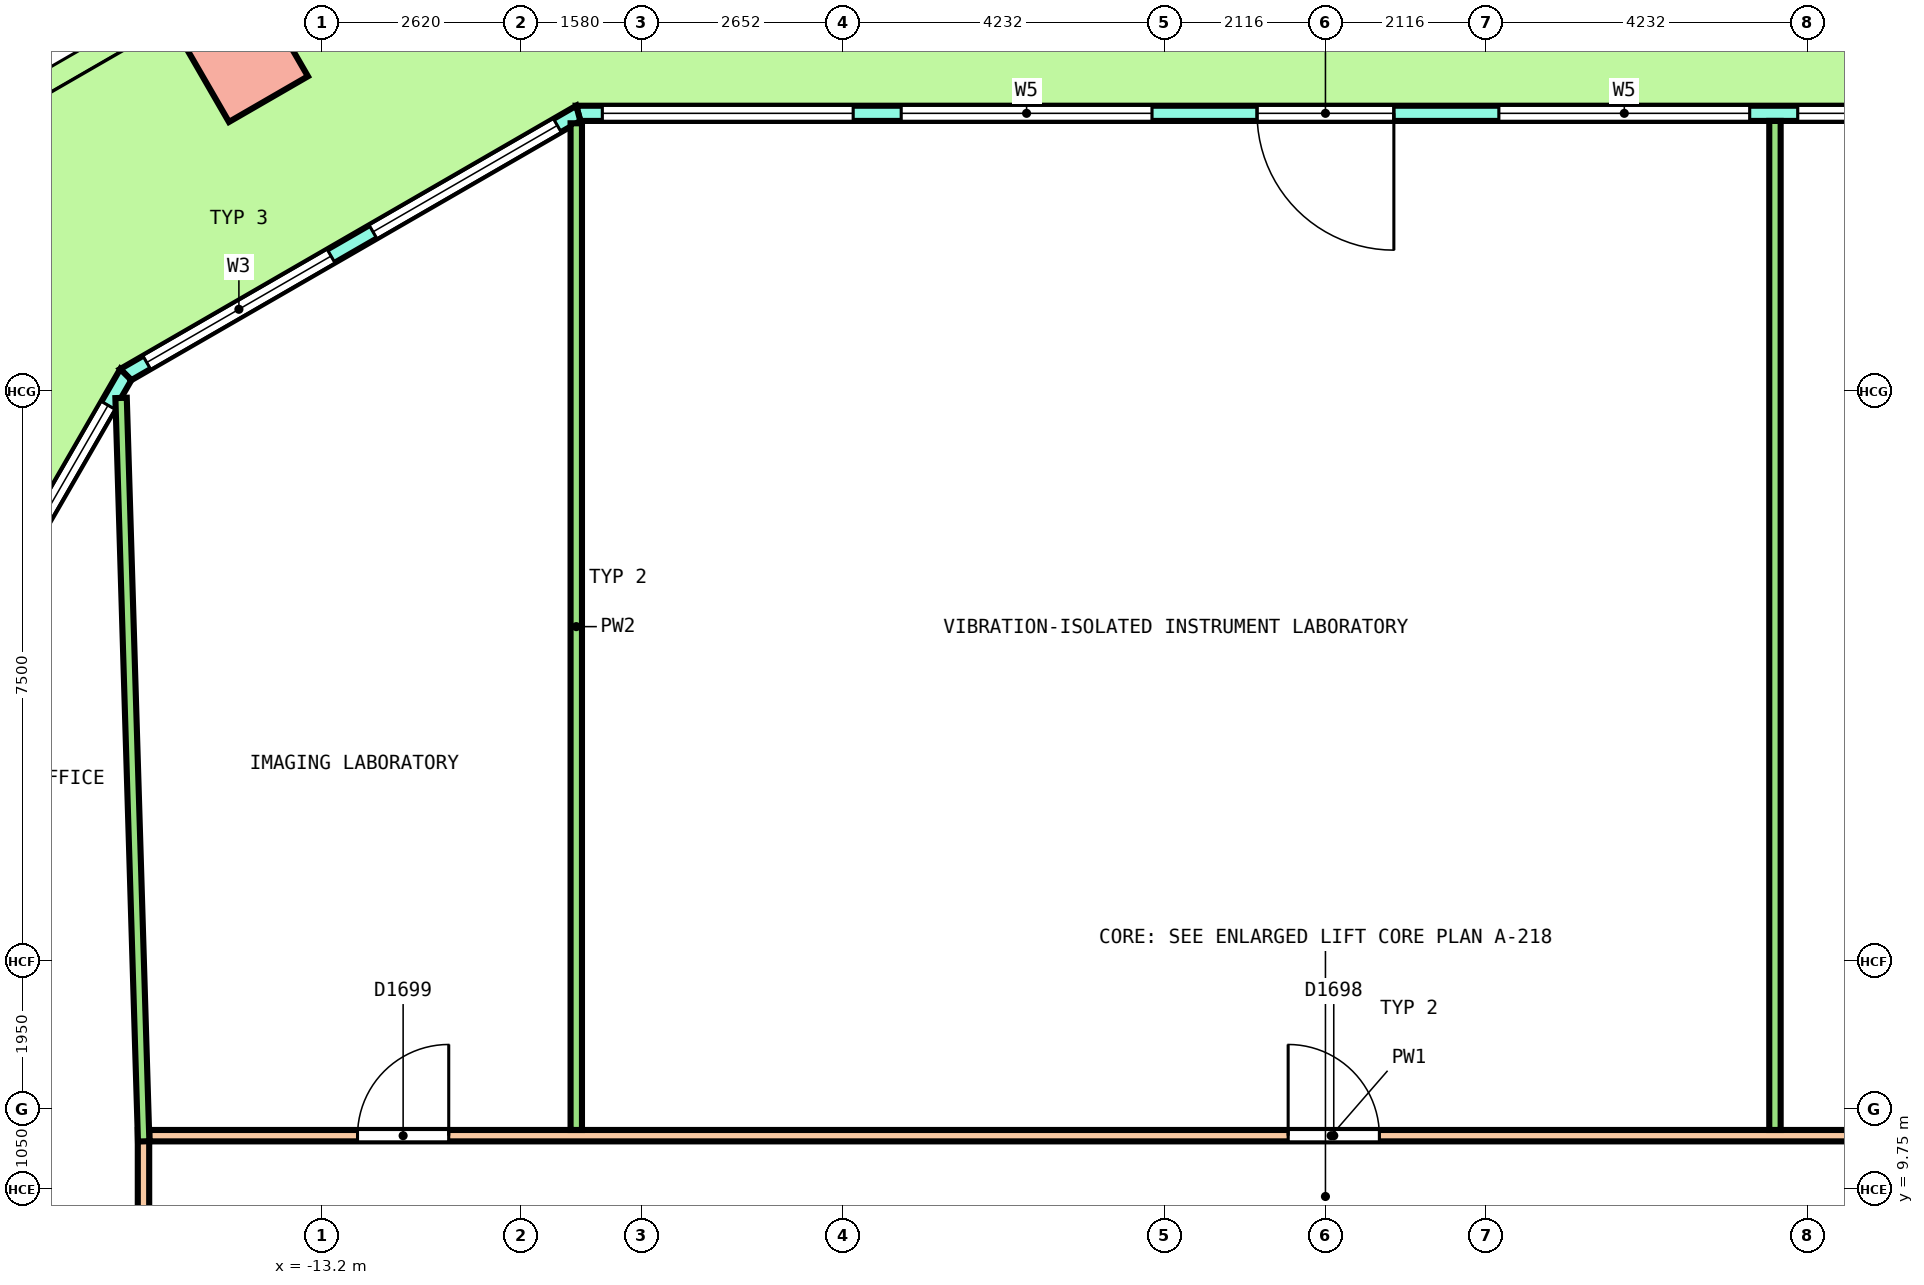
"""IFC4 building model, lengths in metres.
Left out: names, types, materials, properties, quantities, classifications, styles, units other than length and angle.
Written with IfcOpenShell. Run it as: python <this file> out.ifc"""

import sys

from ifc_helpers import new_model, si_unit, direction, frame, frame_2d, origin, origin_2d, place, context, subcontext, project, spatial, polyline, rectangle, outline, extrude, element, fill, save


model = new_model("IFC4")
c1 = context("Model", 3, precision=1e-05, world=origin(), true_north=direction((0.0, 1.0)))
c2 = subcontext(c1, "Body", "Model", "MODEL_VIEW")
j1 = project(units=[si_unit("LENGTHUNIT", "METRE"), si_unit("PLANEANGLEUNIT", "RADIAN")], contexts=[c1])
p1 = place(None, origin())
s1 = spatial("IfcSite", under=j1, at=p1, CompositionType="ELEMENT")
p2 = place(p1, origin())
s2 = spatial("IfcBuilding", under=s1, at=p2, CompositionType="ELEMENT")
p3 = place(p2, frame((0.0, 0.0, 145.2)))
s3 = spatial("IfcBuildingStorey", under=s2, at=p3, CompositionType="ELEMENT", Elevation=145.2)
p4 = place(p3, frame((-14.206, 24.606, 0.0), z_axis=(-0.036325398096, 0.0, 0.999340014936), x_axis=(-0.865311654478, -0.500246354177, -0.031453549198)))
e1 = element("IfcColumn", 1, at=p4, inside=s3, PredefinedType="COLUMN", context=c2, shape_type="SweptSolid", body=[
    extrude(rectangle(XDim=1.2, YDim=1.2, at=origin_2d()), origin(), (0.0, 0.0, 1.0), 4.053),
])
p5 = place(p3, frame((9.83, 23.9, 0.0), z_axis=(0.0, 0.0, 1.0), x_axis=(-1.0, 0.0, 0.0)))
e2 = element("IfcWall", 2, at=p5, inside=s3, PredefinedType="SOLIDWALL", context=c2, shape_type="SweptSolid", body=[
    extrude(outline(polyline([(-0.027, -0.1), (1.011, -0.1), (2.048, -0.1), (3.086, -0.1), (4.123, -0.1), (5.161, -0.1), (6.198, -0.1), (7.236, -0.1), (8.273, -0.1), (9.311, -0.1), (10.348, -0.1), (11.386, -0.1), (12.423, -0.1), (13.461, -0.1), (14.499, -0.1), (15.536, -0.1), (16.573, -0.1), (17.611, -0.1), (18.648, -0.1), (19.686, -0.1), (19.632, 0.1), (18.6, 0.1), (17.569, 0.1), (16.537, 0.1), (15.505, 0.1), (14.473, 0.1), (13.441, 0.1), (12.409, 0.1), (11.377, 0.1), (10.345, 0.1), (9.314, 0.1), (8.282, 0.1), (7.25, 0.1), (6.218, 0.1), (5.186, 0.1), (4.154, 0.1), (3.123, 0.1), (2.091, 0.1), (1.059, 0.1), (0.027, 0.1), (-0.027, -0.1)])), origin(), (0.0, 0.0, 1.0), 4.1),
])
p6 = place(p5, frame((0.316, 0.0, 0.1)))
e3 = element("IfcOpeningElement", 3, at=p6, cuts=e2, PredefinedType="OPENING", context=c2, shape_type="SweptSolid", body=[
    extrude(rectangle(XDim=3.3, YDim=2.9, at=frame_2d((1.65, 1.45))), frame((0.0, 0.11, 0.0), z_axis=(0.0, -1.0, 0.0), x_axis=(1.0, 0.0, 0.0)), (0.0, 0.0, 1.0), 0.22),
])
p7 = place(p5, frame((4.248, 0.0, 0.1)))
e4 = element("IfcOpeningElement", 4, at=p7, cuts=e2, PredefinedType="OPENING", context=c2, shape_type="SweptSolid", body=[
    extrude(rectangle(XDim=3.3, YDim=2.9, at=frame_2d((1.65, 1.45))), frame((0.0, 0.11, 0.0), z_axis=(0.0, -1.0, 0.0), x_axis=(1.0, 0.0, 0.0)), (0.0, 0.0, 1.0), 0.22),
])
p8 = place(p5, frame((8.93, 0.0, 0.0)))
e5 = element("IfcOpeningElement", 5, at=p8, cuts=e2, PredefinedType="OPENING", context=c2, shape_type="SweptSolid", body=[
    extrude(rectangle(XDim=1.8, YDim=2.4, at=frame_2d((0.9, 1.2))), frame((0.0, 0.11, 0.0), z_axis=(0.0, -1.0, 0.0), x_axis=(1.0, 0.0, 0.0)), (0.0, 0.0, 1.0), 0.22),
])
p9 = place(p5, frame((8.93, 0.0, 2.55)))
e6 = element("IfcOpeningElement", 6, at=p9, cuts=e2, PredefinedType="OPENING", context=c2, shape_type="SweptSolid", body=[
    extrude(rectangle(XDim=1.8, YDim=0.45, at=frame_2d((0.9, 0.225))), frame((0.0, 0.11, 0.0), z_axis=(0.0, -1.0, 0.0), x_axis=(1.0, 0.0, 0.0)), (0.0, 0.0, 1.0), 0.22),
])
p10 = place(p5, frame((12.112, 0.0, 0.1)))
e7 = element("IfcOpeningElement", 7, at=p10, cuts=e2, PredefinedType="OPENING", context=c2, shape_type="SweptSolid", body=[
    extrude(rectangle(XDim=3.3, YDim=2.9, at=frame_2d((1.65, 1.45))), frame((0.0, 0.11, 0.0), z_axis=(0.0, -1.0, 0.0), x_axis=(1.0, 0.0, 0.0)), (0.0, 0.0, 1.0), 0.22),
])
p11 = place(p5, frame((16.043, 0.0, 0.1)))
e8 = element("IfcOpeningElement", 8, at=p11, cuts=e2, PredefinedType="OPENING", context=c2, shape_type="SweptSolid", body=[
    extrude(rectangle(XDim=3.3, YDim=2.9, at=frame_2d((1.65, 1.45))), frame((0.0, 0.11, 0.0), z_axis=(0.0, -1.0, 0.0), x_axis=(1.0, 0.0, 0.0)), (0.0, 0.0, 1.0), 0.22),
])
p12 = place(p3, frame((-9.83, 23.9, 0.0), z_axis=(0.0, 0.0, 1.0), x_axis=(-0.866029458321, -0.49999297727, 0.0)))
e9 = element("IfcWall", 9, at=p12, inside=s3, PredefinedType="SOLIDWALL", context=c2, shape_type="SweptSolid", body=[
    extrude(outline(polyline([(-0.027, -0.1), (1.128, -0.1), (2.282, -0.1), (3.437, -0.1), (4.592, -0.1), (5.747, -0.1), (6.901, -0.1), (6.848, 0.1), (5.711, 0.1), (4.574, 0.1), (3.437, 0.1), (2.301, 0.1), (1.164, 0.1), (0.027, 0.1), (-0.027, -0.1)])), origin(), (0.0, 0.0, 1.0), 4.1),
])
p13 = place(p12, frame((0.319, 0.0, 0.1)))
e10 = element("IfcOpeningElement", 10, at=p13, cuts=e9, PredefinedType="OPENING", context=c2, shape_type="SweptSolid", body=[
    extrude(rectangle(XDim=2.8, YDim=2.9, at=frame_2d((1.4, 1.45))), frame((0.0, 0.11, 0.0), z_axis=(0.0, -1.0, 0.0), x_axis=(1.0, 0.0, 0.0)), (0.0, 0.0, 1.0), 0.22),
])
p14 = place(p12, frame((3.756, 0.0, 0.1)))
e11 = element("IfcOpeningElement", 11, at=p14, cuts=e9, PredefinedType="OPENING", context=c2, shape_type="SweptSolid", body=[
    extrude(rectangle(XDim=2.8, YDim=2.9, at=frame_2d((1.4, 1.45))), frame((0.0, 0.11, 0.0), z_axis=(0.0, -1.0, 0.0), x_axis=(1.0, 0.0, 0.0)), (0.0, 0.0, 1.0), 0.22),
])
p15 = place(p3, frame((-15.783, 20.463, 0.0), z_axis=(0.0, 0.0, 1.0), x_axis=(-0.499999083763, -0.866025932773, 0.0)))
e12 = element("IfcWall", 12, at=p15, inside=s3, PredefinedType="SOLIDWALL", context=c2, shape_type="SweptSolid", body=[
    extrude(outline(polyline([(-0.027, -0.1), (1.011, -0.1), (2.048, -0.1), (3.086, -0.1), (4.123, -0.1), (5.161, -0.1), (6.198, -0.1), (7.236, -0.1), (8.273, -0.1), (9.311, -0.1), (10.348, -0.1), (11.386, -0.1), (12.423, -0.1), (13.461, -0.1), (14.499, -0.1), (15.536, -0.1), (16.573, -0.1), (17.611, -0.1), (18.648, -0.1), (19.686, -0.1), (19.632, 0.1), (18.6, 0.1), (17.569, 0.1), (16.537, 0.1), (15.505, 0.1), (14.473, 0.1), (13.441, 0.1), (12.409, 0.1), (11.377, 0.1), (10.345, 0.1), (9.314, 0.1), (8.282, 0.1), (7.25, 0.1), (6.218, 0.1), (5.186, 0.1), (4.154, 0.1), (3.123, 0.1), (2.091, 0.1), (1.059, 0.1), (0.027, 0.1), (-0.027, -0.1)])), origin(), (0.0, 0.0, 1.0), 4.1),
])
p16 = place(p15, frame((0.466, 0.0, 0.1)))
e13 = element("IfcOpeningElement", 13, at=p16, cuts=e12, PredefinedType="OPENING", context=c2, shape_type="SweptSolid", body=[
    extrude(rectangle(XDim=3.0, YDim=2.9, at=frame_2d((1.5, 1.45))), frame((0.0, 0.11, 0.0), z_axis=(0.0, -1.0, 0.0), x_axis=(1.0, 0.0, 0.0)), (0.0, 0.0, 1.0), 0.22),
])
p17 = place(p15, frame((4.398, 0.0, 0.1)))
e14 = element("IfcOpeningElement", 14, at=p17, cuts=e12, PredefinedType="OPENING", context=c2, shape_type="SweptSolid", body=[
    extrude(rectangle(XDim=3.0, YDim=2.9, at=frame_2d((1.5, 1.45))), frame((0.0, 0.11, 0.0), z_axis=(0.0, -1.0, 0.0), x_axis=(1.0, 0.0, 0.0)), (0.0, 0.0, 1.0), 0.22),
])
p18 = place(p15, frame((8.93, 0.0, 0.0)))
e15 = element("IfcOpeningElement", 15, at=p18, cuts=e12, PredefinedType="OPENING", context=c2, shape_type="SweptSolid", body=[
    extrude(rectangle(XDim=1.8, YDim=2.4, at=frame_2d((0.9, 1.2))), frame((0.0, 0.11, 0.0), z_axis=(0.0, -1.0, 0.0), x_axis=(1.0, 0.0, 0.0)), (0.0, 0.0, 1.0), 0.22),
])
p19 = place(p15, frame((8.93, 0.0, 2.55)))
e16 = element("IfcOpeningElement", 16, at=p19, cuts=e12, PredefinedType="OPENING", context=c2, shape_type="SweptSolid", body=[
    extrude(rectangle(XDim=1.8, YDim=0.45, at=frame_2d((0.9, 0.225))), frame((0.0, 0.11, 0.0), z_axis=(0.0, -1.0, 0.0), x_axis=(1.0, 0.0, 0.0)), (0.0, 0.0, 1.0), 0.22),
])
p20 = place(p15, frame((12.261, 0.0, 0.1)))
e17 = element("IfcOpeningElement", 17, at=p20, cuts=e12, PredefinedType="OPENING", context=c2, shape_type="SweptSolid", body=[
    extrude(rectangle(XDim=3.0, YDim=2.9, at=frame_2d((1.5, 1.45))), frame((0.0, 0.11, 0.0), z_axis=(0.0, -1.0, 0.0), x_axis=(1.0, 0.0, 0.0)), (0.0, 0.0, 1.0), 0.22),
])
p21 = place(p15, frame((16.193, 0.0, 0.1)))
e18 = element("IfcOpeningElement", 18, at=p21, cuts=e12, PredefinedType="OPENING", context=c2, shape_type="SweptSolid", body=[
    extrude(rectangle(XDim=3.0, YDim=2.9, at=frame_2d((1.5, 1.45))), frame((0.0, 0.11, 0.0), z_axis=(0.0, -1.0, 0.0), x_axis=(1.0, 0.0, 0.0)), (0.0, 0.0, 1.0), 0.22),
])
p22 = place(p3, frame((-15.475, 10.45, 0.0), z_axis=(0.0, 0.0, 1.0), x_axis=(1.0, 0.0, 0.0)))
e19 = element("IfcWall", 19, at=p22, inside=s3, PredefinedType="PARTITIONING", context=c2, shape_type="SweptSolid", body=[
    extrude(rectangle(XDim=31.1, YDim=0.15, at=frame_2d((15.55, 0.0))), origin(), (0.0, 0.0, 1.0), 3.05),
])
p23 = place(p22, frame((25.521, 0.0, 0.0)))
e20 = element("IfcOpeningElement", 20, at=p23, cuts=e19, PredefinedType="OPENING", context=c2, shape_type="SweptSolid", body=[
    extrude(rectangle(XDim=1.2, YDim=2.1, at=frame_2d((0.6, 1.05))), frame((0.0, 0.085, 0.0), z_axis=(0.0, -1.0, 0.0), x_axis=(1.0, 0.0, 0.0)), (0.0, 0.0, 1.0), 0.17),
])
p24 = place(p22, frame((14.984, 0.0, 0.0)))
e21 = element("IfcOpeningElement", 21, at=p24, cuts=e19, PredefinedType="OPENING", context=c2, shape_type="SweptSolid", body=[
    extrude(rectangle(XDim=1.2, YDim=2.1, at=frame_2d((0.6, 1.05))), frame((0.0, 0.085, 0.0), z_axis=(0.0, -1.0, 0.0), x_axis=(1.0, 0.0, 0.0)), (0.0, 0.0, 1.0), 0.17),
])
p25 = place(p22, frame((2.741, 0.0, 0.0)))
e22 = element("IfcOpeningElement", 22, at=p25, cuts=e19, PredefinedType="OPENING", context=c2, shape_type="SweptSolid", body=[
    extrude(rectangle(XDim=1.2, YDim=2.1, at=frame_2d((0.6, 1.05))), frame((0.0, 0.085, 0.0), z_axis=(0.0, -1.0, 0.0), x_axis=(1.0, 0.0, 0.0)), (0.0, 0.0, 1.0), 0.17),
])
p26 = place(p3, frame((-15.55, 2.657, 0.0), z_axis=(0.0, 0.0, 1.0), x_axis=(0.0, 1.0, 0.0)))
e23 = element("IfcWall", 23, at=p26, inside=s3, PredefinedType="PARTITIONING", context=c2, shape_type="SweptSolid", body=[
    extrude(rectangle(XDim=7.868, YDim=0.15, at=frame_2d((3.934, 0.0))), origin(), (0.0, 0.0, 1.0), 3.05),
])
p27 = place(p3, frame((5.914, 10.525, 0.0), z_axis=(0.0, 0.0, 1.0), x_axis=(0.0, 1.0, 0.0)))
e24 = element("IfcWall", 24, at=p27, inside=s3, PredefinedType="PARTITIONING", context=c2, shape_type="SweptSolid", body=[
    extrude(rectangle(XDim=13.275, YDim=0.15, at=frame_2d((6.638, 0.0))), origin(), (0.0, 0.0, 1.0), 3.05),
])
p28 = place(p3, frame((-9.856, 10.525, 0.0), z_axis=(0.0, 0.0, 1.0), x_axis=(0.0, 1.0, 0.0)))
e25 = element("IfcWall", 25, at=p28, inside=s3, PredefinedType="PARTITIONING", context=c2, shape_type="SweptSolid", body=[
    extrude(rectangle(XDim=13.244, YDim=0.15, at=frame_2d((6.622, 0.0))), origin(), (0.0, 0.0, 1.0), 3.05),
])
p29 = place(p3, frame((-15.845, 20.156, 0.0), z_axis=(0.0, 0.0, 1.0), x_axis=(0.030388076232, -0.999538175771, 0.0)))
e26 = element("IfcWall", 26, at=p29, inside=s3, PredefinedType="PARTITIONING", context=c2, shape_type="SweptSolid", body=[
    extrude(rectangle(XDim=9.786, YDim=0.15, at=frame_2d((4.893, 0.0))), origin(), (0.0, 0.0, 1.0), 3.05),
])
p30 = place(p6, origin())
e27 = element("IfcWindow", 27, at=p30, inside=s3, PartitioningType="SINGLE_PANEL", PredefinedType="WINDOW", context=c2, shape_type="SweptSolid", body=[
    extrude(rectangle(XDim=3.3, YDim=2.9, at=frame_2d((1.65, 1.45))), frame((0.0, 0.03, 0.0), z_axis=(0.0, -1.0, 0.0), x_axis=(1.0, 0.0, 0.0)), (0.0, 0.0, 1.0), 0.06),
])
fill(e3, e27)
p31 = place(p7, origin())
e28 = element("IfcWindow", 28, at=p31, inside=s3, PartitioningType="SINGLE_PANEL", PredefinedType="WINDOW", context=c2, shape_type="SweptSolid", body=[
    extrude(rectangle(XDim=3.3, YDim=2.9, at=frame_2d((1.65, 1.45))), frame((0.0, 0.03, 0.0), z_axis=(0.0, -1.0, 0.0), x_axis=(1.0, 0.0, 0.0)), (0.0, 0.0, 1.0), 0.06),
])
fill(e4, e28)
p32 = place(p8, origin())
e29 = element("IfcDoor", 29, at=p32, inside=s3, OperationType="DOUBLE_DOOR_SINGLE_SWING", PredefinedType="DOOR", context=c2, shape_type="SweptSolid", body=[
    extrude(rectangle(XDim=1.8, YDim=2.4, at=frame_2d((0.9, 1.2))), frame((0.0, 0.025, 0.0), z_axis=(0.0, -1.0, 0.0), x_axis=(1.0, 0.0, 0.0)), (0.0, 0.0, 1.0), 0.05),
])
fill(e5, e29)
p33 = place(p9, origin())
e30 = element("IfcWindow", 30, at=p33, inside=s3, PartitioningType="SINGLE_PANEL", PredefinedType="WINDOW", context=c2, shape_type="SweptSolid", body=[
    extrude(rectangle(XDim=1.8, YDim=0.45, at=frame_2d((0.9, 0.225))), frame((0.0, 0.03, 0.0), z_axis=(0.0, -1.0, 0.0), x_axis=(1.0, 0.0, 0.0)), (0.0, 0.0, 1.0), 0.06),
])
fill(e6, e30)
p34 = place(p10, origin())
e31 = element("IfcWindow", 31, at=p34, inside=s3, PartitioningType="SINGLE_PANEL", PredefinedType="WINDOW", context=c2, shape_type="SweptSolid", body=[
    extrude(rectangle(XDim=3.3, YDim=2.9, at=frame_2d((1.65, 1.45))), frame((0.0, 0.03, 0.0), z_axis=(0.0, -1.0, 0.0), x_axis=(1.0, 0.0, 0.0)), (0.0, 0.0, 1.0), 0.06),
])
fill(e7, e31)
p35 = place(p11, origin())
e32 = element("IfcWindow", 32, at=p35, inside=s3, PartitioningType="SINGLE_PANEL", PredefinedType="WINDOW", context=c2, shape_type="SweptSolid", body=[
    extrude(rectangle(XDim=3.3, YDim=2.9, at=frame_2d((1.65, 1.45))), frame((0.0, 0.03, 0.0), z_axis=(0.0, -1.0, 0.0), x_axis=(1.0, 0.0, 0.0)), (0.0, 0.0, 1.0), 0.06),
])
fill(e8, e32)
p36 = place(p13, origin())
e33 = element("IfcWindow", 33, at=p36, inside=s3, PartitioningType="SINGLE_PANEL", PredefinedType="WINDOW", context=c2, shape_type="SweptSolid", body=[
    extrude(rectangle(XDim=2.8, YDim=2.9, at=frame_2d((1.4, 1.45))), frame((0.0, 0.03, 0.0), z_axis=(0.0, -1.0, 0.0), x_axis=(1.0, 0.0, 0.0)), (0.0, 0.0, 1.0), 0.06),
])
fill(e10, e33)
p37 = place(p14, origin())
e34 = element("IfcWindow", 34, at=p37, inside=s3, PartitioningType="SINGLE_PANEL", PredefinedType="WINDOW", context=c2, shape_type="SweptSolid", body=[
    extrude(rectangle(XDim=2.8, YDim=2.9, at=frame_2d((1.4, 1.45))), frame((0.0, 0.03, 0.0), z_axis=(0.0, -1.0, 0.0), x_axis=(1.0, 0.0, 0.0)), (0.0, 0.0, 1.0), 0.06),
])
fill(e11, e34)
p38 = place(p16, origin())
e35 = element("IfcWindow", 35, at=p38, inside=s3, PartitioningType="SINGLE_PANEL", PredefinedType="WINDOW", context=c2, shape_type="SweptSolid", body=[
    extrude(rectangle(XDim=3.0, YDim=2.9, at=frame_2d((1.5, 1.45))), frame((0.0, 0.03, 0.0), z_axis=(0.0, -1.0, 0.0), x_axis=(1.0, 0.0, 0.0)), (0.0, 0.0, 1.0), 0.06),
])
fill(e13, e35)
p39 = place(p24, origin())
e36 = element("IfcDoor", 36, at=p39, inside=s3, OperationType="DOUBLE_DOOR_SINGLE_SWING", PredefinedType="DOOR", context=c2, shape_type="SweptSolid", body=[
    extrude(rectangle(XDim=1.2, YDim=2.1, at=frame_2d((0.6, 1.05))), frame((0.0, 0.025, 0.0), z_axis=(0.0, -1.0, 0.0), x_axis=(1.0, 0.0, 0.0)), (0.0, 0.0, 1.0), 0.05),
])
fill(e21, e36)
p40 = place(p25, origin())
e37 = element("IfcDoor", 37, at=p40, inside=s3, OperationType="DOUBLE_DOOR_SINGLE_SWING", PredefinedType="DOOR", context=c2, shape_type="SweptSolid", body=[
    extrude(rectangle(XDim=1.2, YDim=2.1, at=frame_2d((0.6, 1.05))), frame((0.0, 0.025, 0.0), z_axis=(0.0, -1.0, 0.0), x_axis=(1.0, 0.0, 0.0)), (0.0, 0.0, 1.0), 0.05),
])
fill(e22, e37)
save(model, sys.argv[1])
